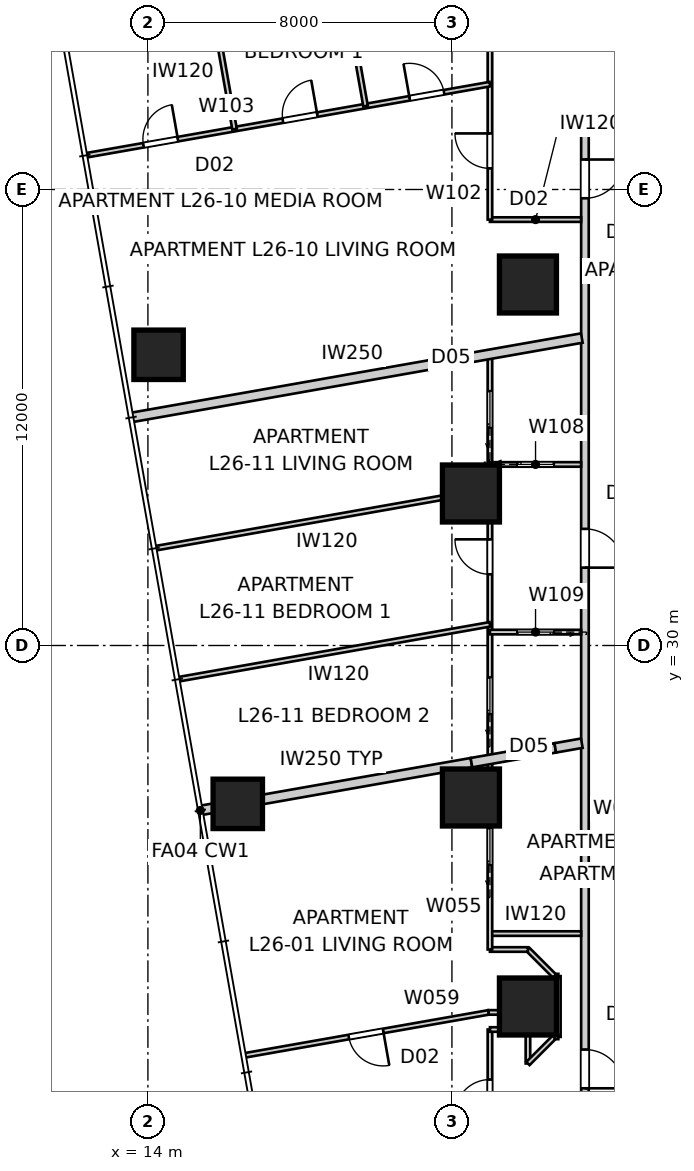
"""IFC4 building model, lengths in metres.
Left out: names, types, materials, properties, quantities, classifications, styles, units other than length and angle.
Written with IfcOpenShell. Run it as: python <this file> out.ifc"""

import sys

from ifc_helpers import new_model, si_unit, direction, frame, frame_2d, origin, origin_2d, place, context, subcontext, project, spatial, rectangle, extrude, element, fill, save


model = new_model("IFC4")
c1 = context("Model", 3, precision=1e-05, world=origin(), true_north=direction((0.0, 1.0)))
c2 = subcontext(c1, "Body", "Model", "MODEL_VIEW")
j1 = project(units=[si_unit("LENGTHUNIT", "METRE"), si_unit("PLANEANGLEUNIT", "RADIAN")], contexts=[c1])
p1 = place(None, origin())
s1 = spatial("IfcSite", under=j1, at=p1, CompositionType="ELEMENT")
p2 = place(p1, origin())
s2 = spatial("IfcBuilding", under=s1, at=p2, CompositionType="ELEMENT")
p3 = place(p2, frame((0.0, 0.0, 96.4)))
s3 = spatial("IfcBuildingStorey", under=s2, at=p3, CompositionType="ELEMENT", Elevation=96.4)
for number, where, z_axis, x_axis in (
    (1, (14.281, 37.65, 0.0), (0.0, 0.0, 1.0), (1.0, 0.0, 0.0)),
    (2, (16.365, 25.833, 0.0), (0.0, 0.0, 1.0), (1.0, 0.0, 0.0)),
):
    element("IfcColumn", number, at=place(p3, frame(where, z_axis=z_axis, x_axis=x_axis)), inside=s3, PredefinedType="COLUMN", context=c2, shape_type="SweptSolid", body=[
        extrude(rectangle(XDim=1.3, YDim=1.3, at=origin_2d()), origin(), (0.0, 0.0, 1.0), 3.4),
    ])
for number, where, z_axis, x_axis in (
    (3, (24.0, 39.5, 0.0), (0.0, 0.0, 1.0), (1.0, 0.0, 0.0)),
    (4, (22.5, 34.0, 0.0), (0.0, 0.0, 1.0), (1.0, 0.0, 0.0)),
    (5, (22.5, 26.0, 0.0), (0.0, 0.0, 1.0), (1.0, 0.0, 0.0)),
    (6, (24.0, 20.5, 0.0), (0.0, 0.0, 1.0), (1.0, 0.0, 0.0)),
):
    element("IfcColumn", number, at=place(p3, frame(where, z_axis=z_axis, x_axis=x_axis)), inside=s3, PredefinedType="COLUMN", context=c2, shape_type="SweptSolid", body=[
        extrude(rectangle(XDim=1.5, YDim=1.5, at=origin_2d()), origin(), (0.0, 0.0, 1.0), 3.4),
    ])
p4 = place(p3, frame((54.5, 43.7, 0.0), z_axis=(0.0, 0.0, 1.0), x_axis=(-1.0, 0.0, 0.0)))
e7 = element("IfcWall", 7, at=p4, inside=s3, PredefinedType="PARTITIONING", context=c2, shape_type="SweptSolid", body=[
    extrude(rectangle(XDim=29.0, YDim=0.2, at=frame_2d((14.5, 0.0))), origin(), (0.0, 0.0, 1.0), 3.25),
])
p5 = place(p4, frame((11.951, 0.0, 0.0)))
e8 = element("IfcOpeningElement", 8, at=p5, cuts=e7, PredefinedType="OPENING", context=c2, shape_type="SweptSolid", body=[
    extrude(rectangle(XDim=1.02, YDim=2.34, at=frame_2d((0.51, 1.17))), frame((0.0, 0.11, 0.0), z_axis=(0.0, -1.0, 0.0), x_axis=(1.0, 0.0, 0.0)), (0.0, 0.0, 1.0), 0.22),
])
p6 = place(p4, frame((4.795, 0.0, 0.0)))
e9 = element("IfcOpeningElement", 9, at=p6, cuts=e7, PredefinedType="OPENING", context=c2, shape_type="SweptSolid", body=[
    extrude(rectangle(XDim=1.02, YDim=2.34, at=frame_2d((0.51, 1.17))), frame((0.0, 0.11, 0.0), z_axis=(0.0, -1.0, 0.0), x_axis=(1.0, 0.0, 0.0)), (0.0, 0.0, 1.0), 0.22),
])
p7 = place(p3, frame((25.5, 43.7, 0.0), z_axis=(0.0, 0.0, 1.0), x_axis=(0.0, -1.0, 0.0)))
e10 = element("IfcWall", 10, at=p7, inside=s3, PredefinedType="PARTITIONING", context=c2, shape_type="SweptSolid", body=[
    extrude(rectangle(XDim=27.4, YDim=0.2, at=frame_2d((13.7, 0.0))), origin(), (0.0, 0.0, 1.0), 3.25),
])
p8 = place(p7, frame((24.333, 0.0, 0.0)))
e11 = element("IfcOpeningElement", 11, at=p8, cuts=e10, PredefinedType="OPENING", context=c2, shape_type="SweptSolid", body=[
    extrude(rectangle(XDim=1.02, YDim=2.1, at=frame_2d((0.51, 1.05))), frame((0.0, 0.11, 0.0), z_axis=(0.0, -1.0, 0.0), x_axis=(1.0, 0.0, 0.0)), (0.0, 0.0, 1.0), 0.22),
])
p9 = place(p7, frame((10.631, 0.0, 0.0)))
e12 = element("IfcOpeningElement", 12, at=p9, cuts=e10, PredefinedType="OPENING", context=c2, shape_type="SweptSolid", body=[
    extrude(rectangle(XDim=1.02, YDim=2.34, at=frame_2d((0.51, 1.17))), frame((0.0, 0.11, 0.0), z_axis=(0.0, -1.0, 0.0), x_axis=(1.0, 0.0, 0.0)), (0.0, 0.0, 1.0), 0.22),
])
p10 = place(p7, frame((0.911, 0.0, 0.0)))
e13 = element("IfcOpeningElement", 13, at=p10, cuts=e10, PredefinedType="OPENING", context=c2, shape_type="SweptSolid", body=[
    extrude(rectangle(XDim=1.02, YDim=2.34, at=frame_2d((0.51, 1.17))), frame((0.0, 0.11, 0.0), z_axis=(0.0, -1.0, 0.0), x_axis=(1.0, 0.0, 0.0)), (0.0, 0.0, 1.0), 0.22),
])
p11 = place(p3, frame((15.38, 25.659, 0.0), z_axis=(0.0, 0.0, 1.0), x_axis=(0.984802553948, 0.173677660443, 0.0)))
e14 = element("IfcWall", 14, at=p11, inside=s3, PredefinedType="PARTITIONING", context=c2, shape_type="SweptSolid", body=[
    extrude(rectangle(XDim=7.244, YDim=0.25, at=frame_2d((3.622, 0.0))), origin(), (0.0, 0.0, 1.0), 3.25),
])
p12 = place(p3, frame((22.513, 26.917, 0.0), z_axis=(0.0, 0.0, 1.0), x_axis=(0.984809882944, 0.17363609779, 0.0)))
e15 = element("IfcWall", 15, at=p12, inside=s3, PredefinedType="PARTITIONING", context=c2, shape_type="SweptSolid", body=[
    extrude(rectangle(XDim=2.24, YDim=0.25, at=frame_2d((1.12, 0.0))), origin(), (0.0, 0.0, 1.0), 2.796),
])
p13 = place(p3, frame((24.719, 27.306, 0.0), z_axis=(0.0, 0.0, 1.0), x_axis=(0.984835495461, 0.173490768861, 0.0)))
e16 = element("IfcWall", 16, at=p13, inside=s3, PredefinedType="PARTITIONING", context=c2, shape_type="SweptSolid", body=[
    extrude(rectangle(XDim=0.709, YDim=0.25, at=frame_2d((0.354, 0.0))), origin(), (0.0, 0.0, 1.0), 3.25),
])
p14 = place(p3, frame((13.556, 35.999, 0.0), z_axis=(0.0, 0.0, 1.0), x_axis=(0.984806609184, 0.173654664517, 0.0)))
e17 = element("IfcWall", 17, at=p14, inside=s3, PredefinedType="PARTITIONING", context=c2, shape_type="SweptSolid", body=[
    extrude(rectangle(XDim=12.044, YDim=0.25, at=frame_2d((6.022, 0.0))), origin(), (0.0, 0.0, 1.0), 3.25),
])
p15 = place(p3, frame((23.0, 22.419, 0.0), z_axis=(0.0, 0.0, 1.0), x_axis=(1.0, 0.0, 0.0)))
e18 = element("IfcWall", 18, at=p15, inside=s3, PredefinedType="PARTITIONING", context=c2, shape_type="SweptSolid", body=[
    extrude(rectangle(XDim=2.4, YDim=0.12, at=frame_2d((1.2, 0.0))), origin(), (0.0, 0.0, 1.0), 3.25),
])
p16 = place(p3, frame((24.0, 20.344, 0.0), z_axis=(0.0, 0.0, 1.0), x_axis=(0.0, -1.0, 0.0)))
e19 = element("IfcWall", 19, at=p16, inside=s3, PredefinedType="PARTITIONING", context=c2, shape_type="SweptSolid", body=[
    extrude(rectangle(XDim=1.344, YDim=0.12, at=frame_2d((0.672, 0.0))), origin(), (0.0, 0.0, 1.0), 3.25),
])
p17 = place(p3, frame((24.0, 19.0, 0.0), z_axis=(0.0, 0.0, 1.0), x_axis=(0.707106781187, 0.707106781187, 0.0)))
e20 = element("IfcWall", 20, at=p17, inside=s3, PredefinedType="PARTITIONING", context=c2, shape_type="SweptSolid", body=[
    extrude(rectangle(XDim=0.99, YDim=0.12, at=frame_2d((0.495, 0.0))), origin(), (0.0, 0.0, 1.0), 3.25),
])
p18 = place(p3, frame((24.8, 19.7, 0.0), z_axis=(0.0, 0.0, 1.0), x_axis=(0.0, 1.0, 0.0)))
e21 = element("IfcWall", 21, at=p18, inside=s3, PredefinedType="PARTITIONING", context=c2, shape_type="SweptSolid", body=[
    extrude(rectangle(XDim=1.6, YDim=0.12, at=frame_2d((0.8, 0.0))), origin(), (0.0, 0.0, 1.0), 3.25),
])
p19 = place(p3, frame((24.7, 21.3, 0.0), z_axis=(0.0, 0.0, 1.0), x_axis=(-0.707106781187, 0.707106781187, 0.0)))
e22 = element("IfcWall", 22, at=p19, inside=s3, PredefinedType="PARTITIONING", context=c2, shape_type="SweptSolid", body=[
    extrude(rectangle(XDim=0.99, YDim=0.12, at=frame_2d((0.495, 0.0))), origin(), (0.0, 0.0, 1.0), 3.25),
])
p20 = place(p3, frame((24.0, 22.0, 0.0), z_axis=(0.0, 0.0, 1.0), x_axis=(-1.0, 0.0, 0.0)))
e23 = element("IfcWall", 23, at=p20, inside=s3, PredefinedType="PARTITIONING", context=c2, shape_type="SweptSolid", body=[
    extrude(rectangle(XDim=1.0, YDim=0.12, at=frame_2d((0.5, 0.0))), origin(), (0.0, 0.0, 1.0), 2.722),
])
p21 = place(p3, frame((23.0, 22.0, 0.0), z_axis=(0.0, 0.0, 1.0), x_axis=(0.0, 1.0, 0.0)))
e24 = element("IfcWall", 24, at=p21, inside=s3, PredefinedType="PARTITIONING", context=c2, shape_type="SweptSolid", body=[
    extrude(rectangle(XDim=15.664, YDim=0.12, at=frame_2d((7.832, 0.0))), origin(), (0.0, 0.0, 1.0), 2.55),
])
p22 = place(p21, frame((9.874, 0.0, 0.0)))
e25 = element("IfcOpeningElement", 25, at=p22, cuts=e24, PredefinedType="OPENING", context=c2, shape_type="SweptSolid", body=[
    extrude(rectangle(XDim=0.92, YDim=2.34, at=frame_2d((0.46, 1.17))), frame((0.0, 0.07, 0.0), z_axis=(0.0, -1.0, 0.0), x_axis=(1.0, 0.0, 0.0)), (0.0, 0.0, 1.0), 0.14),
])
p23 = place(p21, frame((13.734, 0.0, 0.0)))
e26 = element("IfcOpeningElement", 26, at=p23, cuts=e24, PredefinedType="OPENING", context=c2, shape_type="SweptSolid", body=[
    extrude(rectangle(XDim=0.96, YDim=2.1, at=frame_2d((0.48, 1.05))), frame((0.0, 0.07, 0.0), z_axis=(0.0, -1.0, 0.0), x_axis=(1.0, 0.0, 0.0)), (0.0, 0.0, 1.0), 0.14),
])
p24 = place(p21, frame((6.198, 0.0, 0.0)))
e27 = element("IfcOpeningElement", 27, at=p24, cuts=e24, PredefinedType="OPENING", context=c2, shape_type="SweptSolid", body=[
    extrude(rectangle(XDim=0.96, YDim=2.1, at=frame_2d((0.48, 1.05))), frame((0.0, 0.07, 0.0), z_axis=(0.0, -1.0, 0.0), x_axis=(1.0, 0.0, 0.0)), (0.0, 0.0, 1.0), 0.14),
])
p25 = place(p21, frame((2.231, 0.0, 0.0)))
e28 = element("IfcOpeningElement", 28, at=p25, cuts=e24, PredefinedType="OPENING", context=c2, shape_type="SweptSolid", body=[
    extrude(rectangle(XDim=0.96, YDim=2.1, at=frame_2d((0.48, 1.05))), frame((0.0, 0.07, 0.0), z_axis=(0.0, -1.0, 0.0), x_axis=(1.0, 0.0, 0.0)), (0.0, 0.0, 1.0), 0.14),
])
p26 = place(p3, frame((23.0, 13.8, 0.0), z_axis=(0.0, 0.0, 1.0), x_axis=(0.0, 1.0, 0.0)))
e29 = element("IfcWall", 29, at=p26, inside=s3, PredefinedType="PARTITIONING", context=c2, shape_type="SweptSolid", body=[
    extrude(rectangle(XDim=6.094, YDim=0.12, at=frame_2d((3.047, 0.0))), origin(), (0.0, 0.0, 1.0), 3.25),
])
p27 = place(p26, frame((3.857, 0.0, 0.0)))
e30 = element("IfcOpeningElement", 30, at=p27, cuts=e29, PredefinedType="OPENING", context=c2, shape_type="SweptSolid", body=[
    extrude(rectangle(XDim=0.92, YDim=2.34, at=frame_2d((0.46, 1.17))), frame((0.0, 0.07, 0.0), z_axis=(0.0, -1.0, 0.0), x_axis=(1.0, 0.0, 0.0)), (0.0, 0.0, 1.0), 0.14),
])
p28 = place(p3, frame((23.0, 19.894, 0.0), z_axis=(0.0, 0.0, 1.0), x_axis=(1.0, 0.0, 0.0)))
e31 = element("IfcWall", 31, at=p28, inside=s3, PredefinedType="PARTITIONING", context=c2, shape_type="SweptSolid", body=[
    extrude(rectangle(XDim=1.0, YDim=0.12, at=frame_2d((0.5, 0.0))), origin(), (0.0, 0.0, 1.0), 3.25),
])
p29 = place(p3, frame((24.0, 20.344, 0.0), z_axis=(0.0, 0.0, 1.0), x_axis=(-1.0, 0.0, 0.0)))
e32 = element("IfcWall", 32, at=p29, inside=s3, PredefinedType="PARTITIONING", context=c2, shape_type="SweptSolid", body=[
    extrude(rectangle(XDim=1.039, YDim=0.12, at=frame_2d((0.52, 0.0))), origin(), (0.0, 0.0, 1.0), 3.25),
])
p30 = place(p3, frame((22.961, 20.344, 0.0), z_axis=(0.0, 0.0, 1.0), x_axis=(-0.984809249117, -0.173639692622, 0.0)))
e33 = element("IfcWall", 33, at=p30, inside=s3, PredefinedType="PARTITIONING", context=c2, shape_type="SweptSolid", body=[
    extrude(rectangle(XDim=6.503, YDim=0.12, at=frame_2d((3.251, 0.0))), origin(), (0.0, 0.0, 1.0), 3.25),
])
p31 = place(p30, frame((2.811, 0.0, 0.0)))
e34 = element("IfcOpeningElement", 34, at=p31, cuts=e33, PredefinedType="OPENING", context=c2, shape_type="SweptSolid", body=[
    extrude(rectangle(XDim=0.92, YDim=2.34, at=frame_2d((0.46, 1.17))), frame((0.0, 0.07, 0.0), z_axis=(0.0, -1.0, 0.0), x_axis=(1.0, 0.0, 0.0)), (0.0, 0.0, 1.0), 0.14),
])
p32 = place(p3, frame((25.4, 41.208, 0.0), z_axis=(0.0, 0.0, 1.0), x_axis=(-1.0, 0.0, 0.0)))
e35 = element("IfcWall", 35, at=p32, inside=s3, PredefinedType="PARTITIONING", context=c2, shape_type="SweptSolid", body=[
    extrude(rectangle(XDim=2.4, YDim=0.12, at=frame_2d((1.2, 0.0))), origin(), (0.0, 0.0, 1.0), 2.638),
])
p33 = place(p3, frame((23.0, 41.208, 0.0), z_axis=(0.0, 0.0, 1.0), x_axis=(0.0, 1.0, 0.0)))
e36 = element("IfcWall", 36, at=p33, inside=s3, PredefinedType="PARTITIONING", context=c2, shape_type="SweptSolid", body=[
    extrude(rectangle(XDim=4.581, YDim=0.12, at=frame_2d((2.291, 0.0))), origin(), (0.0, 0.0, 1.0), 2.638),
])
p34 = place(p33, frame((1.348, 0.0, 0.0)))
e37 = element("IfcOpeningElement", 37, at=p34, cuts=e36, PredefinedType="OPENING", context=c2, shape_type="SweptSolid", body=[
    extrude(rectangle(XDim=0.92, YDim=2.34, at=frame_2d((0.46, 1.17))), frame((0.0, 0.07, 0.0), z_axis=(0.0, -1.0, 0.0), x_axis=(1.0, 0.0, 0.0)), (0.0, 0.0, 1.0), 0.14),
])
p35 = place(p3, frame((12.38, 42.9, 0.0), z_axis=(0.0, 0.0, 1.0), x_axis=(0.984807253583, 0.173651010046, 0.0)))
e38 = element("IfcWall", 38, at=p35, inside=s3, PredefinedType="PARTITIONING", context=c2, shape_type="SweptSolid", body=[
    extrude(rectangle(XDim=10.783, YDim=0.12, at=frame_2d((5.392, 0.0))), origin(), (0.0, 0.0, 1.0), 3.25),
])
p36 = place(p35, frame((1.525, 0.0, 0.0)))
e39 = element("IfcOpeningElement", 39, at=p36, cuts=e38, PredefinedType="OPENING", context=c2, shape_type="SweptSolid", body=[
    extrude(rectangle(XDim=0.92, YDim=2.34, at=frame_2d((0.46, 1.17))), frame((0.0, 0.07, 0.0), z_axis=(0.0, -1.0, 0.0), x_axis=(1.0, 0.0, 0.0)), (0.0, 0.0, 1.0), 0.14),
])
p37 = place(p35, frame((5.25, 0.0, 0.0)))
e40 = element("IfcOpeningElement", 40, at=p37, cuts=e38, PredefinedType="OPENING", context=c2, shape_type="SweptSolid", body=[
    extrude(rectangle(XDim=0.92, YDim=2.34, at=frame_2d((0.46, 1.17))), frame((0.0, 0.07, 0.0), z_axis=(0.0, -1.0, 0.0), x_axis=(1.0, 0.0, 0.0)), (0.0, 0.0, 1.0), 0.14),
])
p38 = place(p35, frame((8.637, 0.0, 0.0)))
e41 = element("IfcOpeningElement", 41, at=p38, cuts=e38, PredefinedType="OPENING", context=c2, shape_type="SweptSolid", body=[
    extrude(rectangle(XDim=0.92, YDim=2.34, at=frame_2d((0.46, 1.17))), frame((0.0, 0.07, 0.0), z_axis=(0.0, -1.0, 0.0), x_axis=(1.0, 0.0, 0.0)), (0.0, 0.0, 1.0), 0.14),
])
p39 = place(p3, frame((18.432, 51.542, 0.0), z_axis=(0.0, 0.0, 1.0), x_axis=(0.173647177755, -0.984807929323, 0.0)))
e42 = element("IfcWall", 42, at=p39, inside=s3, PredefinedType="PARTITIONING", context=c2, shape_type="SweptSolid", body=[
    extrude(rectangle(XDim=7.46, YDim=0.12, at=frame_2d((3.73, 0.0))), origin(), (0.0, 0.0, 1.0), 3.25),
])
p40 = place(p3, frame((16.28, 43.588, 0.0), z_axis=(0.0, 0.0, 1.0), x_axis=(-0.173660541335, 0.984805572884, 0.0)))
e43 = element("IfcWall", 43, at=p40, inside=s3, PredefinedType="PARTITIONING", context=c2, shape_type="SweptSolid", body=[
    extrude(rectangle(XDim=3.46, YDim=0.12, at=frame_2d((1.73, 0.0))), origin(), (0.0, 0.0, 1.0), 3.25),
])
p41 = place(p3, frame((23.0, 34.764, 0.0), z_axis=(0.0, 0.0, 1.0), x_axis=(1.0, 0.0, 0.0)))
e44 = element("IfcWall", 44, at=p41, inside=s3, PredefinedType="PARTITIONING", context=c2, shape_type="SweptSolid", body=[
    extrude(rectangle(XDim=2.4, YDim=0.12, at=frame_2d((1.2, 0.0))), origin(), (0.0, 0.0, 1.0), 3.25),
])
p42 = place(p41, frame((0.72, 0.0, 0.0)))
e45 = element("IfcOpeningElement", 45, at=p42, cuts=e44, PredefinedType="OPENING", context=c2, shape_type="SweptSolid", body=[
    extrude(rectangle(XDim=0.96, YDim=2.1, at=frame_2d((0.48, 1.05))), frame((0.0, 0.07, 0.0), z_axis=(0.0, -1.0, 0.0), x_axis=(1.0, 0.0, 0.0)), (0.0, 0.0, 1.0), 0.14),
])
p43 = place(p3, frame((25.4, 30.353, 0.0), z_axis=(0.0, 0.0, 1.0), x_axis=(-1.0, 0.0, 0.0)))
e46 = element("IfcWall", 46, at=p43, inside=s3, PredefinedType="PARTITIONING", context=c2, shape_type="SweptSolid", body=[
    extrude(rectangle(XDim=2.4, YDim=0.12, at=frame_2d((1.2, 0.0))), origin(), (0.0, 0.0, 1.0), 3.25),
])
p44 = place(p43, frame((0.72, 0.0, 0.0)))
e47 = element("IfcOpeningElement", 47, at=p44, cuts=e46, PredefinedType="OPENING", context=c2, shape_type="SweptSolid", body=[
    extrude(rectangle(XDim=0.96, YDim=2.1, at=frame_2d((0.48, 1.05))), frame((0.0, 0.07, 0.0), z_axis=(0.0, -1.0, 0.0), x_axis=(1.0, 0.0, 0.0)), (0.0, 0.0, 1.0), 0.14),
])
p45 = place(p3, frame((23.0, 34.11, 0.0), z_axis=(0.0, 0.0, 1.0), x_axis=(-0.984808038675, -0.173646557583, 0.0)))
e48 = element("IfcWall", 48, at=p45, inside=s3, PredefinedType="PARTITIONING", context=c2, shape_type="SweptSolid", body=[
    extrude(rectangle(XDim=8.932, YDim=0.12, at=frame_2d((4.466, 0.0))), origin(), (0.0, 0.0, 1.0), 3.25),
])
p46 = place(p3, frame((23.0, 30.556, 0.0), z_axis=(0.0, 0.0, 1.0), x_axis=(-0.984807787824, -0.173647980238, 0.0)))
e49 = element("IfcWall", 49, at=p46, inside=s3, PredefinedType="PARTITIONING", context=c2, shape_type="SweptSolid", body=[
    extrude(rectangle(XDim=8.315, YDim=0.12, at=frame_2d((4.157, 0.0))), origin(), (0.0, 0.0, 1.0), 3.25),
])
for number, where, z_axis, x_axis in (
    (50, (24.8, 19.7, 0.0), (0.0, 0.0, 1.0), (-1.0, 0.0, 0.0)),
    (51, (24.8, 21.3, 0.0), (0.0, 0.0, 1.0), (-1.0, 0.0, 0.0)),
):
    element("IfcWall", number, at=place(p3, frame(where, z_axis=z_axis, x_axis=x_axis)), inside=s3, PredefinedType="PARTITIONING", context=c2, shape_type="SweptSolid", body=[
        extrude(rectangle(XDim=0.1, YDim=0.12, at=frame_2d((0.05, 0.0))), origin(), (0.0, 0.0, 1.0), 3.25),
    ])
p47 = place(p8, origin())
e52 = element("IfcDoor", 52, at=p47, inside=s3, OperationType="SINGLE_SWING_RIGHT", PredefinedType="DOOR", context=c2, shape_type="SweptSolid", body=[
    extrude(rectangle(XDim=1.02, YDim=2.1, at=frame_2d((0.51, 1.05))), frame((0.0, 0.025, 0.0), z_axis=(0.0, -1.0, 0.0), x_axis=(1.0, 0.0, 0.0)), (0.0, 0.0, 1.0), 0.05),
])
fill(e11, e52)
p48 = place(p9, origin())
e53 = element("IfcDoor", 53, at=p48, inside=s3, OperationType="SINGLE_SWING_RIGHT", PredefinedType="DOOR", context=c2, shape_type="SweptSolid", body=[
    extrude(rectangle(XDim=1.02, YDim=2.34, at=frame_2d((0.51, 1.17))), frame((0.0, 0.025, 0.0), z_axis=(0.0, -1.0, 0.0), x_axis=(1.0, 0.0, 0.0)), (0.0, 0.0, 1.0), 0.05),
])
fill(e12, e53)
p49 = place(p10, origin())
e54 = element("IfcDoor", 54, at=p49, inside=s3, OperationType="SINGLE_SWING_LEFT", PredefinedType="DOOR", context=c2, shape_type="SweptSolid", body=[
    extrude(rectangle(XDim=1.02, YDim=2.34, at=frame_2d((0.51, 1.17))), frame((0.0, 0.025, 0.0), z_axis=(0.0, -1.0, 0.0), x_axis=(1.0, 0.0, 0.0)), (0.0, 0.0, 1.0), 0.05),
])
fill(e13, e54)
p50 = place(p27, origin())
e55 = element("IfcDoor", 55, at=p50, inside=s3, OperationType="SINGLE_SWING_LEFT", PredefinedType="DOOR", context=c2, shape_type="SweptSolid", body=[
    extrude(rectangle(XDim=0.92, YDim=2.34, at=frame_2d((0.46, 1.17))), frame((0.0, 0.025, 0.0), z_axis=(0.0, -1.0, 0.0), x_axis=(1.0, 0.0, 0.0)), (0.0, 0.0, 1.0), 0.05),
])
fill(e30, e55)
p51 = place(p22, origin())
e56 = element("IfcDoor", 56, at=p51, inside=s3, OperationType="SINGLE_SWING_RIGHT", PredefinedType="DOOR", context=c2, shape_type="SweptSolid", body=[
    extrude(rectangle(XDim=0.92, YDim=2.34, at=frame_2d((0.46, 1.17))), frame((0.0, 0.025, 0.0), z_axis=(0.0, -1.0, 0.0), x_axis=(1.0, 0.0, 0.0)), (0.0, 0.0, 1.0), 0.05),
])
fill(e25, e56)
p52 = place(p42, origin())
e57 = element("IfcDoor", 57, at=p52, inside=s3, OperationType="SLIDING_TO_LEFT", PredefinedType="DOOR", context=c2, shape_type="SweptSolid", body=[
    extrude(rectangle(XDim=0.96, YDim=2.1, at=frame_2d((0.48, 1.05))), frame((0.0, 0.025, 0.0), z_axis=(0.0, -1.0, 0.0), x_axis=(1.0, 0.0, 0.0)), (0.0, 0.0, 1.0), 0.05),
])
fill(e45, e57)
p53 = place(p44, origin())
e58 = element("IfcDoor", 58, at=p53, inside=s3, OperationType="SLIDING_TO_LEFT", PredefinedType="DOOR", context=c2, shape_type="SweptSolid", body=[
    extrude(rectangle(XDim=0.96, YDim=2.1, at=frame_2d((0.48, 1.05))), frame((0.0, 0.025, 0.0), z_axis=(0.0, -1.0, 0.0), x_axis=(1.0, 0.0, 0.0)), (0.0, 0.0, 1.0), 0.05),
])
fill(e47, e58)
p54 = place(p34, origin())
e59 = element("IfcDoor", 59, at=p54, inside=s3, OperationType="SINGLE_SWING_RIGHT", PredefinedType="DOOR", context=c2, shape_type="SweptSolid", body=[
    extrude(rectangle(XDim=0.92, YDim=2.34, at=frame_2d((0.46, 1.17))), frame((0.0, 0.025, 0.0), z_axis=(0.0, -1.0, 0.0), x_axis=(1.0, 0.0, 0.0)), (0.0, 0.0, 1.0), 0.05),
])
fill(e37, e59)
p55 = place(p23, origin())
e60 = element("IfcDoor", 60, at=p55, inside=s3, OperationType="SLIDING_TO_LEFT", PredefinedType="DOOR", context=c2, shape_type="SweptSolid", body=[
    extrude(rectangle(XDim=0.96, YDim=2.1, at=frame_2d((0.48, 1.05))), frame((0.0, 0.025, 0.0), z_axis=(0.0, -1.0, 0.0), x_axis=(1.0, 0.0, 0.0)), (0.0, 0.0, 1.0), 0.05),
])
fill(e26, e60)
p56 = place(p24, origin())
e61 = element("IfcDoor", 61, at=p56, inside=s3, OperationType="SLIDING_TO_LEFT", PredefinedType="DOOR", context=c2, shape_type="SweptSolid", body=[
    extrude(rectangle(XDim=0.96, YDim=2.1, at=frame_2d((0.48, 1.05))), frame((0.0, 0.025, 0.0), z_axis=(0.0, -1.0, 0.0), x_axis=(1.0, 0.0, 0.0)), (0.0, 0.0, 1.0), 0.05),
])
fill(e27, e61)
p57 = place(p36, origin())
e62 = element("IfcDoor", 62, at=p57, inside=s3, OperationType="SINGLE_SWING_RIGHT", PredefinedType="DOOR", context=c2, shape_type="SweptSolid", body=[
    extrude(rectangle(XDim=0.92, YDim=2.34, at=frame_2d((0.46, 1.17))), frame((0.0, 0.025, 0.0), z_axis=(0.0, -1.0, 0.0), x_axis=(1.0, 0.0, 0.0)), (0.0, 0.0, 1.0), 0.05),
])
fill(e39, e62)
p58 = place(p37, origin())
e63 = element("IfcDoor", 63, at=p58, inside=s3, OperationType="SINGLE_SWING_RIGHT", PredefinedType="DOOR", context=c2, shape_type="SweptSolid", body=[
    extrude(rectangle(XDim=0.92, YDim=2.34, at=frame_2d((0.46, 1.17))), frame((0.0, 0.025, 0.0), z_axis=(0.0, -1.0, 0.0), x_axis=(1.0, 0.0, 0.0)), (0.0, 0.0, 1.0), 0.05),
])
fill(e40, e63)
p59 = place(p38, origin())
e64 = element("IfcDoor", 64, at=p59, inside=s3, OperationType="SINGLE_SWING_LEFT", PredefinedType="DOOR", context=c2, shape_type="SweptSolid", body=[
    extrude(rectangle(XDim=0.92, YDim=2.34, at=frame_2d((0.46, 1.17))), frame((0.0, 0.025, 0.0), z_axis=(0.0, -1.0, 0.0), x_axis=(1.0, 0.0, 0.0)), (0.0, 0.0, 1.0), 0.05),
])
fill(e41, e64)
p60 = place(p31, origin())
e65 = element("IfcDoor", 65, at=p60, inside=s3, OperationType="SINGLE_SWING_LEFT", PredefinedType="DOOR", context=c2, shape_type="SweptSolid", body=[
    extrude(rectangle(XDim=0.92, YDim=2.34, at=frame_2d((0.46, 1.17))), frame((0.0, 0.025, 0.0), z_axis=(0.0, -1.0, 0.0), x_axis=(1.0, 0.0, 0.0)), (0.0, 0.0, 1.0), 0.05),
])
fill(e34, e65)
p61 = place(p25, origin())
e66 = element("IfcDoor", 66, at=p61, inside=s3, OperationType="SLIDING_TO_LEFT", PredefinedType="DOOR", context=c2, shape_type="SweptSolid", body=[
    extrude(rectangle(XDim=0.96, YDim=2.1, at=frame_2d((0.48, 1.05))), frame((0.0, 0.025, 0.0), z_axis=(0.0, -1.0, 0.0), x_axis=(1.0, 0.0, 0.0)), (0.0, 0.0, 1.0), 0.05),
])
fill(e28, e66)
save(model, sys.argv[1])
